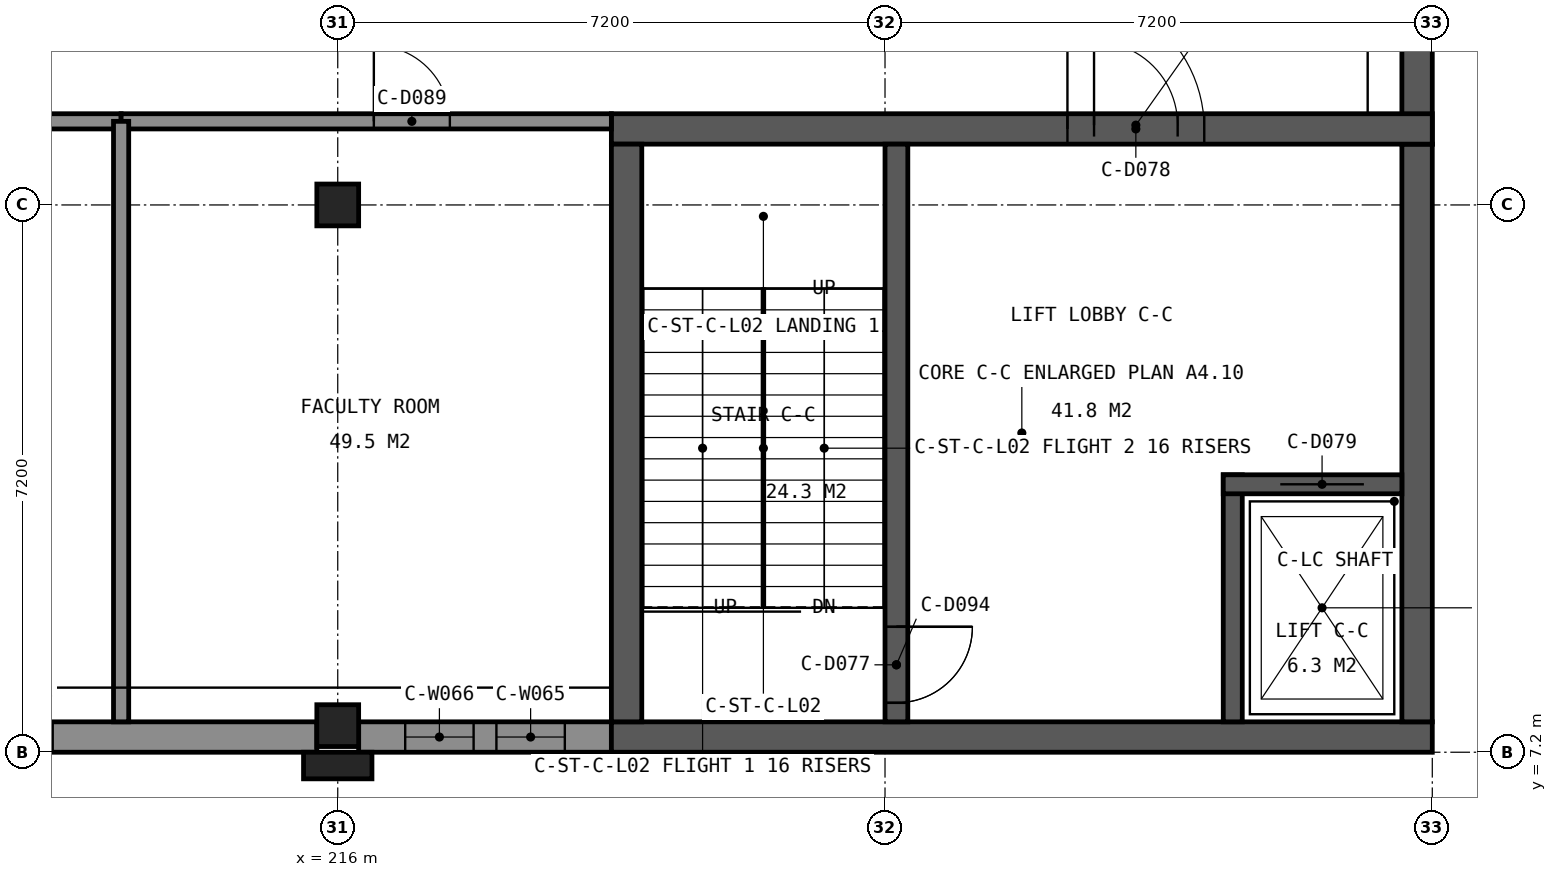
"""IFC4 building model, lengths in metres.
Left out: names, types, materials, properties, quantities, classifications, styles, units other than length and angle.
Written with IfcOpenShell. Run it as: python <this file> out.ifc"""

import sys

from ifc_helpers import new_model, si_unit, direction, frame, frame_2d, origin, origin_2d, place, context, subcontext, project, spatial, polyline, rectangle, outline, extrude, element, fill, save


model = new_model("IFC4")
c1 = context("Model", 3, precision=1e-05, world=origin(), true_north=direction((0.0, 1.0)))
c2 = subcontext(c1, "Body", "Model", "MODEL_VIEW")
j1 = project(units=[si_unit("LENGTHUNIT", "METRE"), si_unit("PLANEANGLEUNIT", "RADIAN")], contexts=[c1])
p1 = place(None, origin())
s1 = spatial("IfcSite", under=j1, at=p1, CompositionType="ELEMENT")
p2 = place(p1, origin())
s2 = spatial("IfcBuilding", under=s1, at=p2, CompositionType="ELEMENT")
p3 = place(p2, frame((0.0, 0.0, 14.4)))
s3 = spatial("IfcBuildingStorey", under=s2, at=p3, CompositionType="ELEMENT", Elevation=14.4)
for number, where, z_axis, x_axis in (
    (1, (216.0, 14.4, 0.0), (0.0, 0.0, 1.0), (1.0, 0.0, 0.0)),
    (2, (216.0, 7.55, 0.0), (0.0, 0.0, 1.0), (1.0, 0.0, 0.0)),
):
    element("IfcColumn", number, at=place(p3, frame(where, z_axis=z_axis, x_axis=x_axis)), inside=s3, PredefinedType="COLUMN", context=c2, shape_type="SweptSolid", body=[
        extrude(rectangle(XDim=0.55, YDim=0.55, at=origin_2d()), origin(), (0.0, 0.0, 1.0), 4.8),
    ])
p4 = place(p3, frame((215.725, 7.4, 0.0), z_axis=(0.0, 0.0, 1.0), x_axis=(-1.0, 0.0, 0.0)))
e3 = element("IfcWall", 3, at=p4, inside=s3, PredefinedType="SOLIDWALL", context=c2, shape_type="SweptSolid", body=[
    extrude(rectangle(XDim=6.65, YDim=0.4, at=frame_2d((3.325, 0.0))), origin(), (0.0, 0.0, 1.0), 3.7),
])
p5 = place(p4, frame((3.475, 0.0, 1.8)))
e4 = element("IfcOpeningElement", 4, at=p5, cuts=e3, PredefinedType="OPENING", context=c2, shape_type="SweptSolid", body=[
    extrude(rectangle(XDim=0.9, YDim=1.2, at=frame_2d((0.45, 0.6))), frame((0.0, 0.21, 0.0), z_axis=(0.0, -1.0, 0.0), x_axis=(1.0, 0.0, 0.0)), (0.0, 0.0, 1.0), 0.42),
])
p6 = place(p3, frame((219.6, 7.4, 0.0), z_axis=(0.0, 0.0, 1.0), x_axis=(-1.0, 0.0, 0.0)))
e5 = element("IfcWall", 5, at=p6, inside=s3, PredefinedType="SOLIDWALL", context=c2, shape_type="SweptSolid", body=[
    extrude(rectangle(XDim=3.325, YDim=0.4, at=frame_2d((1.663, 0.0))), origin(), (0.0, 0.0, 1.0), 3.7),
])
p7 = place(p6, frame((0.613, 0.0, 1.8)))
e6 = element("IfcOpeningElement", 6, at=p7, cuts=e5, PredefinedType="OPENING", context=c2, shape_type="SweptSolid", body=[
    extrude(rectangle(XDim=0.9, YDim=1.2, at=frame_2d((0.45, 0.6))), frame((0.0, 0.21, 0.0), z_axis=(0.0, -1.0, 0.0), x_axis=(1.0, 0.0, 0.0)), (0.0, 0.0, 1.0), 0.42),
])
p8 = place(p6, frame((1.812, 0.0, 1.8)))
e7 = element("IfcOpeningElement", 7, at=p8, cuts=e5, PredefinedType="OPENING", context=c2, shape_type="SweptSolid", body=[
    extrude(rectangle(XDim=0.9, YDim=1.2, at=frame_2d((0.45, 0.6))), frame((0.0, 0.21, 0.0), z_axis=(0.0, -1.0, 0.0), x_axis=(1.0, 0.0, 0.0)), (0.0, 0.0, 1.0), 0.42),
])
p9 = place(p3, frame((230.4, 7.4, 0.0), z_axis=(0.0, 0.0, 1.0), x_axis=(-1.0, 0.0, 0.0)))
e8 = element("IfcWall", 8, at=p9, inside=s3, PredefinedType="SHEAR", context=c2, shape_type="SweptSolid", body=[
    extrude(rectangle(XDim=10.8, YDim=0.4, at=frame_2d((5.4, 0.0))), origin(), (0.0, 0.0, 1.0), 4.5),
])
p10 = place(p3, frame((230.2, 21.325, 0.0), z_axis=(0.0, 0.0, 1.0), x_axis=(0.0, -1.0, 0.0)))
e9 = element("IfcWall", 9, at=p10, inside=s3, PredefinedType="SHEAR", context=c2, shape_type="SweptSolid", body=[
    extrude(rectangle(XDim=6.125, YDim=0.4, at=frame_2d((3.062, 0.0))), origin(), (0.0, 0.0, 1.0), 3.7),
])
p11 = place(p10, frame((3.212, 0.0, 1.8)))
e10 = element("IfcOpeningElement", 10, at=p11, cuts=e9, PredefinedType="OPENING", context=c2, shape_type="SweptSolid", body=[
    extrude(rectangle(XDim=0.9, YDim=1.2, at=frame_2d((0.45, 0.6))), frame((0.0, 0.21, 0.0), z_axis=(0.0, -1.0, 0.0), x_axis=(1.0, 0.0, 0.0)), (0.0, 0.0, 1.0), 0.42),
])
p12 = place(p3, frame((230.2, 15.2, 0.0), z_axis=(0.0, 0.0, 1.0), x_axis=(0.0, -1.0, 0.0)))
e11 = element("IfcWall", 11, at=p12, inside=s3, PredefinedType="SHEAR", context=c2, shape_type="SweptSolid", body=[
    extrude(rectangle(XDim=7.6, YDim=0.4, at=frame_2d((3.8, 0.0))), origin(), (0.0, 0.0, 1.0), 4.5),
])
p13 = place(p3, frame((219.6, 15.4, 0.0), z_axis=(0.0, 0.0, 1.0), x_axis=(1.0, 0.0, 0.0)))
e12 = element("IfcWall", 12, at=p13, inside=s3, PredefinedType="SHEAR", context=c2, shape_type="SweptSolid", body=[
    extrude(rectangle(XDim=10.8, YDim=0.4, at=frame_2d((5.4, 0.0))), origin(), (0.0, 0.0, 1.0), 4.5),
])
p14 = place(p13, frame((6.0, 0.0, 0.0)))
e13 = element("IfcOpeningElement", 13, at=p14, cuts=e12, PredefinedType="OPENING", context=c2, shape_type="SweptSolid", body=[
    extrude(rectangle(XDim=1.8, YDim=2.1, at=frame_2d((0.9, 1.05))), frame((0.0, 0.21, 0.0), z_axis=(0.0, -1.0, 0.0), x_axis=(1.0, 0.0, 0.0)), (0.0, 0.0, 1.0), 0.42),
])
p15 = place(p3, frame((219.8, 15.2, 0.0), z_axis=(0.0, 0.0, 1.0), x_axis=(0.0, -1.0, 0.0)))
e14 = element("IfcWall", 14, at=p15, inside=s3, PredefinedType="SHEAR", context=c2, shape_type="SweptSolid", body=[
    extrude(rectangle(XDim=7.6, YDim=0.4, at=frame_2d((3.8, 0.0))), origin(), (0.0, 0.0, 1.0), 4.5),
])
p16 = place(p3, frame((223.35, 15.2, 0.0), z_axis=(0.0, 0.0, 1.0), x_axis=(0.0, -1.0, 0.0)))
e15 = element("IfcWall", 15, at=p16, inside=s3, PredefinedType="SHEAR", context=c2, shape_type="SweptSolid", body=[
    extrude(rectangle(XDim=7.6, YDim=0.3, at=frame_2d((3.8, 0.0))), origin(), (0.0, 0.0, 1.0), 4.5),
])
p17 = place(p16, frame((6.35, 0.0, 0.0)))
e16 = element("IfcOpeningElement", 16, at=p17, cuts=e15, PredefinedType="OPENING", context=c2, shape_type="SweptSolid", body=[
    extrude(rectangle(XDim=1.0, YDim=2.1, at=frame_2d((0.5, 1.05))), frame((0.0, 0.16, 0.0), z_axis=(0.0, -1.0, 0.0), x_axis=(1.0, 0.0, 0.0)), (0.0, 0.0, 1.0), 0.32),
])
p18 = place(p3, frame((227.775, 10.85, 0.0), z_axis=(0.0, 0.0, 1.0), x_axis=(0.0, -1.0, 0.0)))
e17 = element("IfcWall", 17, at=p18, inside=s3, PredefinedType="SHEAR", context=c2, shape_type="SweptSolid", body=[
    extrude(rectangle(XDim=3.25, YDim=0.25, at=frame_2d((1.625, 0.0))), origin(), (0.0, 0.0, 1.0), 4.5),
])
p19 = place(p3, frame((227.65, 10.725, 0.0), z_axis=(0.0, 0.0, 1.0), x_axis=(1.0, 0.0, 0.0)))
e18 = element("IfcWall", 18, at=p19, inside=s3, PredefinedType="SHEAR", context=c2, shape_type="SweptSolid", body=[
    extrude(rectangle(XDim=2.35, YDim=0.25, at=frame_2d((1.175, 0.0))), origin(), (0.0, 0.0, 1.0), 4.5),
])
p20 = place(p19, frame((0.75, 0.0, 0.0)))
e19 = element("IfcOpeningElement", 19, at=p20, cuts=e18, PredefinedType="OPENING", context=c2, shape_type="SweptSolid", body=[
    extrude(rectangle(XDim=1.1, YDim=2.1, at=frame_2d((0.55, 1.05))), frame((0.0, 0.135, 0.0), z_axis=(0.0, -1.0, 0.0), x_axis=(1.0, 0.0, 0.0)), (0.0, 0.0, 1.0), 0.27),
])
p21 = place(p3, frame((230.2, 17.8, 4.8), z_axis=(0.0, 0.0, 1.0), x_axis=(0.0, -1.0, 0.0)))
e20 = element("IfcWall", 20, at=p21, inside=s3, PredefinedType="PARAPET", context=c2, shape_type="SweptSolid", body=[
    extrude(rectangle(XDim=2.2, YDim=0.4, at=frame_2d((1.1, 0.0))), origin(), (0.0, 0.0, 1.0), 0.4),
])
p22 = place(p3, frame((219.6, 7.4, 4.8), z_axis=(0.0, 0.0, 1.0), x_axis=(-1.0, 0.0, 0.0)))
e21 = element("IfcWall", 21, at=p22, inside=s3, PredefinedType="PARAPET", context=c2, shape_type="SweptSolid", body=[
    extrude(rectangle(XDim=20.4, YDim=0.4, at=frame_2d((10.2, 0.0))), origin(), (0.0, 0.0, 1.0), 0.4),
])
p23 = place(p3, frame((219.6, 15.45, 4.8), z_axis=(0.0, 0.0, 1.0), x_axis=(1.0, 0.0, 0.0)))
e22 = element("IfcWall", 22, at=p23, inside=s3, PredefinedType="SOLIDWALL", context=c2, shape_type="SweptSolid", body=[
    extrude(outline(polyline([(0.0, 0.0), (10.8, 0.0), (10.8, 2.15), (5.4, 2.45), (0.0, 2.15), (0.0, 0.0)])), frame((0.0, 0.15, 0.0), z_axis=(0.0, -1.0, 0.0), x_axis=(1.0, 0.0, 0.0)), (0.0, 0.0, 1.0), 0.3),
])
p24 = place(p23, frame((6.35, 0.0, 0.0)))
e23 = element("IfcOpeningElement", 23, at=p24, cuts=e22, PredefinedType="OPENING", context=c2, shape_type="SweptSolid", body=[
    extrude(rectangle(XDim=1.1, YDim=2.1, at=frame_2d((0.55, 1.05))), frame((0.0, 0.16, 0.0), z_axis=(0.0, -1.0, 0.0), x_axis=(1.0, 0.0, 0.0)), (0.0, 0.0, 1.0), 0.32),
])
p25 = place(p3, frame((219.6, 7.35, 4.8), z_axis=(0.0, 0.0, 1.0), x_axis=(1.0, 0.0, 0.0)))
e24 = element("IfcWall", 24, at=p25, inside=s3, PredefinedType="SOLIDWALL", context=c2, shape_type="SweptSolid", body=[
    extrude(outline(polyline([(0.0, 0.0), (10.8, 0.0), (10.8, 2.15), (5.4, 2.45), (0.0, 2.15), (0.0, 0.0)])), frame((0.0, 0.15, 0.0), z_axis=(0.0, -1.0, 0.0), x_axis=(1.0, 0.0, 0.0)), (0.0, 0.0, 1.0), 0.3),
])
for number, where, z_axis, x_axis in (
    (25, (219.75, 15.3, 4.8), (0.0, 0.0, 1.0), (0.0, -1.0, 0.0)),
    (26, (230.25, 15.3, 4.8), (0.0, 0.0, 1.0), (0.0, -1.0, 0.0)),
):
    element("IfcWall", number, at=place(p3, frame(where, z_axis=z_axis, x_axis=x_axis)), inside=s3, PredefinedType="SOLIDWALL", context=c2, shape_type="SweptSolid", body=[
        extrude(rectangle(XDim=7.8, YDim=0.3, at=frame_2d((3.9, 0.0))), origin(), (0.0, 0.0, 1.0), 2.15),
    ])
p26 = place(p3, frame((223.35, 15.3, 4.8), z_axis=(0.0, 0.0, 1.0), x_axis=(0.0, -1.0, 0.0)))
e27 = element("IfcWall", 27, at=p26, inside=s3, PredefinedType="SOLIDWALL", context=c2, shape_type="SweptSolid", body=[
    extrude(rectangle(XDim=7.8, YDim=0.3, at=frame_2d((3.9, 0.0))), origin(), (0.0, 0.0, 1.0), 2.15),
])
p27 = place(p26, frame((6.45, 0.0, 0.0)))
e28 = element("IfcOpeningElement", 28, at=p27, cuts=e27, PredefinedType="OPENING", context=c2, shape_type="SweptSolid", body=[
    extrude(rectangle(XDim=1.0, YDim=2.1, at=frame_2d((0.5, 1.05))), frame((0.0, 0.16, 0.0), z_axis=(0.0, -1.0, 0.0), x_axis=(1.0, 0.0, 0.0)), (0.0, 0.0, 1.0), 0.32),
])
p28 = place(p3, frame((216.0, 7.025, 0.0), z_axis=(0.0, 0.0, 1.0), x_axis=(1.0, 0.0, 0.0)))
e29 = element("IfcColumn", 29, at=p28, inside=s3, PredefinedType="PILASTER", context=c2, shape_type="SweptSolid", body=[
    extrude(rectangle(XDim=0.9, YDim=0.35, at=origin_2d()), origin(), (0.0, 0.0, 1.0), 3.9),
])
p29 = place(p3, frame((230.4, 6.575, 4.5), z_axis=(0.0, 0.0, 1.0), x_axis=(-1.0, 0.0, 0.0)))
e30 = element("IfcWall", 30, at=p29, inside=s3, PredefinedType="SOLIDWALL", context=c2, shape_type="SweptSolid", body=[
    extrude(rectangle(XDim=72.75, YDim=0.25, at=frame_2d((36.375, 0.0))), origin(), (0.0, 0.0, 1.0), 0.65),
])
p30 = place(p3, frame((199.2, 15.5, 0.0), z_axis=(0.0, 0.0, 1.0), x_axis=(1.0, 0.0, 0.0)))
e31 = element("IfcWall", 31, at=p30, inside=s3, PredefinedType="PARTITIONING", context=c2, shape_type="SweptSolid", body=[
    extrude(rectangle(XDim=13.95, YDim=0.2, at=frame_2d((6.975, 0.0))), origin(), (0.0, 0.0, 1.0), 3.7),
])
p31 = place(p30, frame((6.475, 0.0, 0.0)))
e32 = element("IfcOpeningElement", 32, at=p31, cuts=e31, PredefinedType="OPENING", context=c2, shape_type="SweptSolid", body=[
    extrude(rectangle(XDim=1.0, YDim=2.1, at=frame_2d((0.5, 1.05))), frame((0.0, 0.11, 0.0), z_axis=(0.0, -1.0, 0.0), x_axis=(1.0, 0.0, 0.0)), (0.0, 0.0, 1.0), 0.22),
])
p32 = place(p3, frame((213.15, 15.5, 0.0), z_axis=(0.0, 0.0, 1.0), x_axis=(1.0, 0.0, 0.0)))
e33 = element("IfcWall", 33, at=p32, inside=s3, PredefinedType="PARTITIONING", context=c2, shape_type="SweptSolid", body=[
    extrude(rectangle(XDim=6.45, YDim=0.2, at=frame_2d((3.225, 0.0))), origin(), (0.0, 0.0, 1.0), 3.7),
])
p33 = place(p32, frame((3.325, 0.0, 0.0)))
e34 = element("IfcOpeningElement", 34, at=p33, cuts=e33, PredefinedType="OPENING", context=c2, shape_type="SweptSolid", body=[
    extrude(rectangle(XDim=1.0, YDim=2.1, at=frame_2d((0.5, 1.05))), frame((0.0, 0.11, 0.0), z_axis=(0.0, -1.0, 0.0), x_axis=(1.0, 0.0, 0.0)), (0.0, 0.0, 1.0), 0.22),
])
p34 = place(p3, frame((213.15, 15.5, 0.0), z_axis=(0.0, 0.0, 1.0), x_axis=(0.0, -1.0, 0.0)))
e35 = element("IfcWall", 35, at=p34, inside=s3, PredefinedType="PARTITIONING", context=c2, shape_type="SweptSolid", body=[
    extrude(rectangle(XDim=7.9, YDim=0.2, at=frame_2d((3.95, 0.0))), origin(), (0.0, 0.0, 1.0), 3.7),
])
p35 = place(p7, origin())
e36 = element("IfcWindow", 36, at=p35, inside=s3, PartitioningType="SINGLE_PANEL", PredefinedType="WINDOW", context=c2, shape_type="SweptSolid", body=[
    extrude(rectangle(XDim=0.9, YDim=1.2, at=frame_2d((0.45, 0.6))), frame((0.0, -0.09, 0.0), z_axis=(0.0, -1.0, 0.0), x_axis=(1.0, 0.0, 0.0)), (0.0, 0.0, 1.0), 0.06),
])
fill(e6, e36)
p36 = place(p8, origin())
e37 = element("IfcWindow", 37, at=p36, inside=s3, PartitioningType="SINGLE_PANEL", PredefinedType="WINDOW", context=c2, shape_type="SweptSolid", body=[
    extrude(rectangle(XDim=0.9, YDim=1.2, at=frame_2d((0.45, 0.6))), frame((0.0, -0.09, 0.0), z_axis=(0.0, -1.0, 0.0), x_axis=(1.0, 0.0, 0.0)), (0.0, 0.0, 1.0), 0.06),
])
fill(e7, e37)
p37 = place(p17, origin())
e38 = element("IfcDoor", 38, at=p37, inside=s3, OperationType="NOTDEFINED", PredefinedType="DOOR", context=c2, shape_type="SweptSolid", body=[
    extrude(rectangle(XDim=1.0, YDim=2.1, at=frame_2d((0.5, 1.05))), frame((0.0, 0.025, 0.0), z_axis=(0.0, -1.0, 0.0), x_axis=(1.0, 0.0, 0.0)), (0.0, 0.0, 1.0), 0.05),
])
fill(e16, e38)
p38 = place(p14, origin())
e39 = element("IfcDoor", 39, at=p38, inside=s3, OperationType="NOTDEFINED", PredefinedType="DOOR", context=c2, shape_type="SweptSolid", body=[
    extrude(rectangle(XDim=1.8, YDim=2.1, at=frame_2d((0.9, 1.05))), frame((0.0, 0.025, 0.0), z_axis=(0.0, -1.0, 0.0), x_axis=(1.0, 0.0, 0.0)), (0.0, 0.0, 1.0), 0.05),
])
fill(e13, e39)
p39 = place(p20, origin())
e40 = element("IfcDoor", 40, at=p39, inside=s3, OperationType="SLIDING_TO_LEFT", PredefinedType="DOOR", context=c2, shape_type="SweptSolid", body=[
    extrude(rectangle(XDim=1.1, YDim=2.1, at=frame_2d((0.55, 1.05))), frame((0.0, 0.025, 0.0), z_axis=(0.0, -1.0, 0.0), x_axis=(1.0, 0.0, 0.0)), (0.0, 0.0, 1.0), 0.05),
])
fill(e19, e40)
p40 = place(p33, origin())
e41 = element("IfcDoor", 41, at=p40, inside=s3, OperationType="NOTDEFINED", PredefinedType="DOOR", context=c2, shape_type="SweptSolid", body=[
    extrude(rectangle(XDim=1.0, YDim=2.1, at=frame_2d((0.5, 1.05))), frame((0.0, 0.025, 0.0), z_axis=(0.0, -1.0, 0.0), x_axis=(1.0, 0.0, 0.0)), (0.0, 0.0, 1.0), 0.05),
])
fill(e34, e41)
p41 = place(p27, origin())
e42 = element("IfcDoor", 42, at=p41, inside=s3, OperationType="NOTDEFINED", PredefinedType="DOOR", context=c2, shape_type="SweptSolid", body=[
    extrude(rectangle(XDim=1.0, YDim=2.1, at=frame_2d((0.5, 1.05))), frame((0.0, 0.025, 0.0), z_axis=(0.0, -1.0, 0.0), x_axis=(1.0, 0.0, 0.0)), (0.0, 0.0, 1.0), 0.05),
])
fill(e28, e42)
p42 = place(p24, origin())
e43 = element("IfcDoor", 43, at=p42, inside=s3, OperationType="NOTDEFINED", PredefinedType="DOOR", context=c2, shape_type="SweptSolid", body=[
    extrude(rectangle(XDim=1.1, YDim=2.1, at=frame_2d((0.55, 1.05))), frame((0.0, 0.025, 0.0), z_axis=(0.0, -1.0, 0.0), x_axis=(1.0, 0.0, 0.0)), (0.0, 0.0, 1.0), 0.05),
])
fill(e23, e43)
save(model, sys.argv[1])
